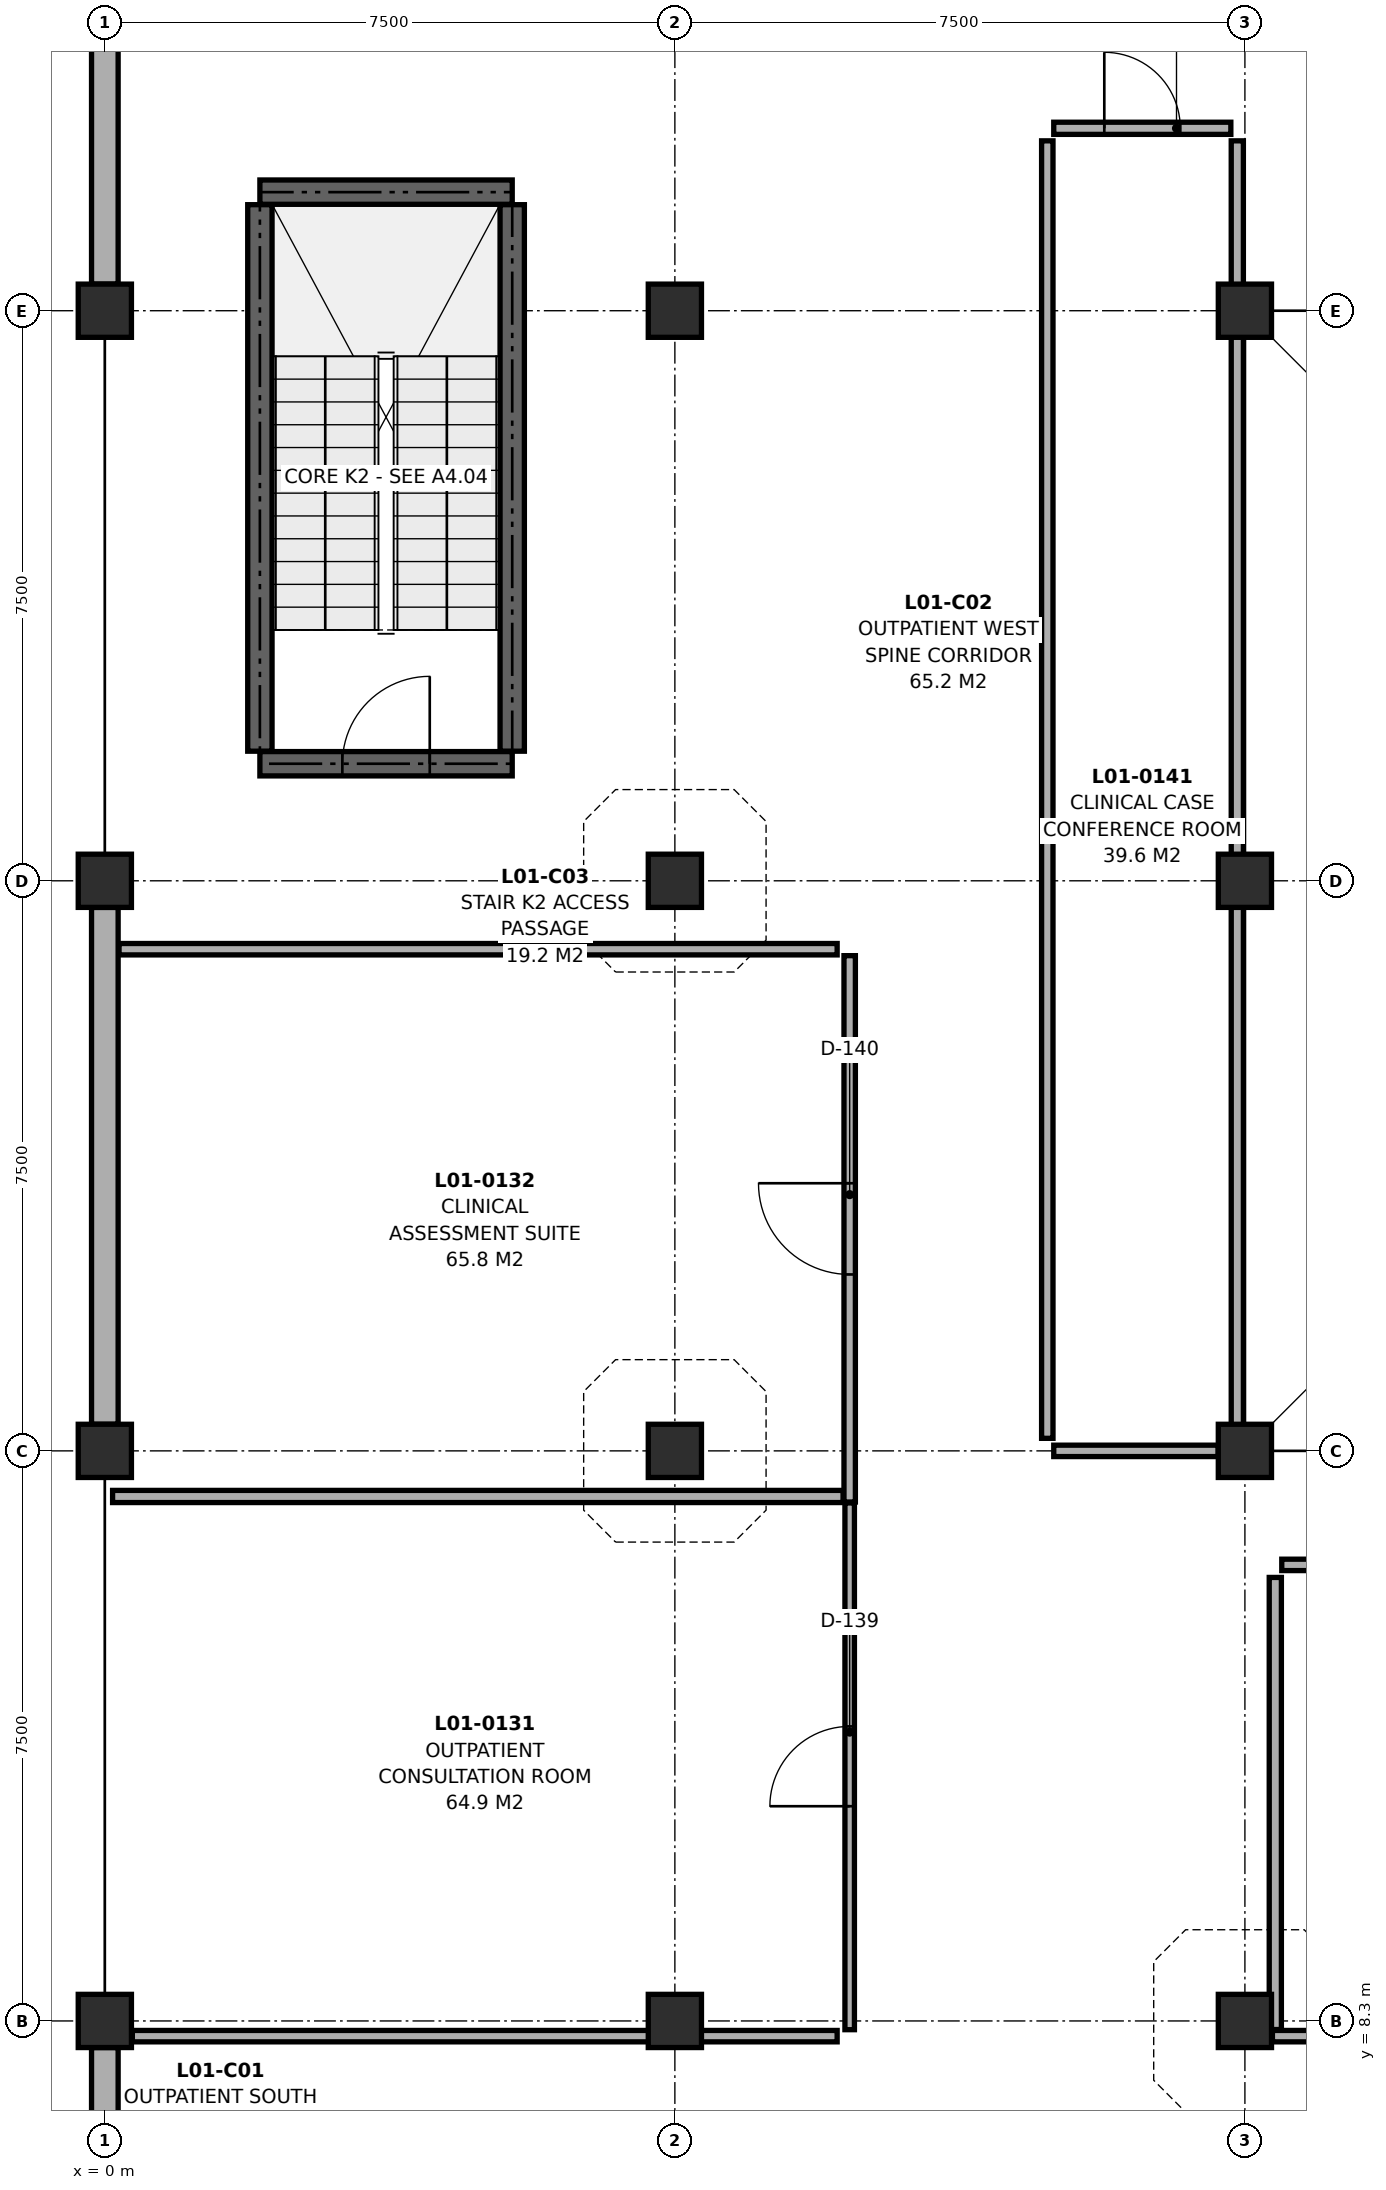
"""IFC4 building model, lengths in metres.
Left out: names, types, materials, properties, quantities, classifications, styles, units other than length and angle.
Written with IfcOpenShell. Run it as: python <this file> out.ifc"""

import sys

from ifc_helpers import new_model, si_unit, direction, frame, frame_2d, origin, origin_2d, place, context, subcontext, project, spatial, rectangle, extrude, element, fill, save


model = new_model("IFC4")
c1 = context("Model", 3, precision=1e-05, world=origin(), true_north=direction((0.0, 1.0)))
c2 = subcontext(c1, "Body", "Model", "MODEL_VIEW")
j1 = project(units=[si_unit("LENGTHUNIT", "METRE"), si_unit("PLANEANGLEUNIT", "RADIAN")], contexts=[c1])
p1 = place(None, origin())
s1 = spatial("IfcSite", under=j1, at=p1, CompositionType="ELEMENT")
p2 = place(p1, origin())
s2 = spatial("IfcBuilding", under=s1, at=p2, CompositionType="ELEMENT")
p3 = place(p2, frame((0.0, 0.0, 5.0)))
s3 = spatial("IfcBuildingStorey", under=s2, at=p3, CompositionType="ELEMENT", Elevation=5.0)
for number, where, z_axis, x_axis in (
    (1, (0.0, 8.3, 0.0), (0.0, 0.0, 1.0), (1.0, 0.0, 0.0)),
    (2, (0.0, 15.8, 0.0), (0.0, 0.0, 1.0), (1.0, 0.0, 0.0)),
    (3, (0.0, 23.3, 0.0), (0.0, 0.0, 1.0), (1.0, 0.0, 0.0)),
    (4, (0.0, 30.8, 0.0), (0.0, 0.0, 1.0), (1.0, 0.0, 0.0)),
    (5, (7.5, 8.3, 0.0), (0.0, 0.0, 1.0), (1.0, 0.0, 0.0)),
    (6, (7.5, 15.8, 0.0), (0.0, 0.0, 1.0), (1.0, 0.0, 0.0)),
    (7, (7.5, 23.3, 0.0), (0.0, 0.0, 1.0), (1.0, 0.0, 0.0)),
    (8, (7.5, 30.8, 0.0), (0.0, 0.0, 1.0), (1.0, 0.0, 0.0)),
    (9, (15.0, 8.3, 0.0), (0.0, 0.0, 1.0), (1.0, 0.0, 0.0)),
    (10, (15.0, 15.8, 0.0), (0.0, 0.0, 1.0), (1.0, 0.0, 0.0)),
    (11, (15.0, 23.3, 0.0), (0.0, 0.0, 1.0), (1.0, 0.0, 0.0)),
    (12, (15.0, 30.8, 0.0), (0.0, 0.0, 1.0), (1.0, 0.0, 0.0)),
):
    element("IfcColumn", number, at=place(p3, frame(where, z_axis=z_axis, x_axis=x_axis)), inside=s3, PredefinedType="COLUMN", context=c2, shape_type="SweptSolid", body=[
        extrude(rectangle(XDim=0.7, YDim=0.7, at=origin_2d()), origin(), (0.0, 0.0, 1.0), 4.2),
    ])
for number, where, z_axis, x_axis in (
    (13, (0.0, 1.15, 0.0), (0.0, 0.0, 1.0), (0.0, 1.0, 0.0)),
    (14, (0.0, 16.15, 0.0), (0.0, 0.0, 1.0), (0.0, 1.0, 0.0)),
    (15, (0.0, 31.15, 0.0), (0.0, 0.0, 1.0), (0.0, 1.0, 0.0)),
):
    element("IfcWall", number, at=place(p3, frame(where, z_axis=z_axis, x_axis=x_axis)), inside=s3, PredefinedType="SOLIDWALL", context=c2, shape_type="SweptSolid", body=[
        extrude(rectangle(XDim=6.8, YDim=0.35, at=frame_2d((3.4, 0.0))), origin(), (0.0, 0.0, 1.0), 3.535),
    ])
p4 = place(p3, frame((5.36, 25.005, 0.0), z_axis=(0.0, 0.0, 1.0), x_axis=(0.0, 1.0, 0.0)))
e16 = element("IfcWall", 16, at=p4, inside=s3, PredefinedType="SHEAR", context=c2, shape_type="SweptSolid", body=[
    extrude(rectangle(XDim=7.19, YDim=0.32, at=frame_2d((3.595, 0.0))), origin(), (0.0, 0.0, 1.0), 4.2),
])
p5 = place(p3, frame((5.36, 32.36, 0.0), z_axis=(0.0, 0.0, 1.0), x_axis=(-1.0, 0.0, 0.0)))
e17 = element("IfcWall", 17, at=p5, inside=s3, PredefinedType="SHEAR", context=c2, shape_type="SweptSolid", body=[
    extrude(rectangle(XDim=3.32, YDim=0.32, at=frame_2d((1.66, 0.0))), origin(), (0.0, 0.0, 1.0), 4.2),
])
p6 = place(p3, frame((2.04, 32.195, 0.0), z_axis=(0.0, 0.0, 1.0), x_axis=(0.0, -1.0, 0.0)))
e18 = element("IfcWall", 18, at=p6, inside=s3, PredefinedType="SHEAR", context=c2, shape_type="SweptSolid", body=[
    extrude(rectangle(XDim=7.19, YDim=0.32, at=frame_2d((3.595, 0.0))), origin(), (0.0, 0.0, 1.0), 4.2),
])
p7 = place(p3, frame((2.04, 24.84, 0.0), z_axis=(0.0, 0.0, 1.0), x_axis=(1.0, 0.0, 0.0)))
e19 = element("IfcWall", 19, at=p7, inside=s3, PredefinedType="SHEAR", context=c2, shape_type="SweptSolid", body=[
    extrude(rectangle(XDim=3.32, YDim=0.32, at=frame_2d((1.66, 0.0))), origin(), (0.0, 0.0, 1.0), 4.2),
])
p8 = place(p7, frame((1.085, 0.0, 0.0)))
e20 = element("IfcOpeningElement", 20, at=p8, cuts=e19, PredefinedType="OPENING", context=c2, shape_type="SweptSolid", body=[
    extrude(rectangle(XDim=1.15, YDim=2.15, at=frame_2d((0.575, 1.075))), frame((0.0, 0.172, 0.0), z_axis=(0.0, -1.0, 0.0), x_axis=(1.0, 0.0, 0.0)), (0.0, 0.0, 1.0), 0.344),
])
p9 = place(p3, frame((15.362, 8.1, 0.0), z_axis=(0.0, 0.0, 1.0), x_axis=(1.0, 0.0, 0.0)))
e21 = element("IfcWall", 21, at=p9, inside=s3, PredefinedType="PARTITIONING", context=c2, shape_type="SweptSolid", body=[
    extrude(rectangle(XDim=14.546, YDim=0.15, at=frame_2d((7.273, 0.0))), origin(), (0.0, 0.0, 1.0), 3.265),
])
p10 = place(p9, frame((7.662, 0.0, 0.0)))
e22 = element("IfcOpeningElement", 22, at=p10, cuts=e21, PredefinedType="OPENING", context=c2, shape_type="SweptSolid", body=[
    extrude(rectangle(XDim=1.56, YDim=2.3, at=frame_2d((0.78, 1.15))), frame((0.0, 0.087, 0.0), z_axis=(0.0, -1.0, 0.0), x_axis=(1.0, 0.0, 0.0)), (0.0, 0.0, 1.0), 0.174),
])
p11 = place(p3, frame((9.8, 8.185, 0.0), z_axis=(0.0, 0.0, 1.0), x_axis=(0.0, 1.0, 0.0)))
e23 = element("IfcWall", 23, at=p11, inside=s3, PredefinedType="PARTITIONING", context=c2, shape_type="SweptSolid", body=[
    extrude(rectangle(XDim=6.93, YDim=0.125, at=frame_2d((3.465, 0.0))), origin(), (0.0, 0.0, 1.0), 3.265),
])
p12 = place(p11, frame((2.94, 0.0, 0.0)))
e24 = element("IfcOpeningElement", 24, at=p12, cuts=e23, PredefinedType="OPENING", context=c2, shape_type="SweptSolid", body=[
    extrude(rectangle(XDim=1.05, YDim=2.15, at=frame_2d((0.525, 1.075))), frame((0.0, 0.074, 0.0), z_axis=(0.0, -1.0, 0.0), x_axis=(1.0, 0.0, 0.0)), (0.0, 0.0, 1.0), 0.149),
])
p13 = place(p3, frame((9.8, 15.127, 0.0), z_axis=(0.0, 0.0, 1.0), x_axis=(0.0, 1.0, 0.0)))
e25 = element("IfcWall", 25, at=p13, inside=s3, PredefinedType="PARTITIONING", context=c2, shape_type="SweptSolid", body=[
    extrude(rectangle(XDim=7.188, YDim=0.15, at=frame_2d((3.594, 0.0))), origin(), (0.0, 0.0, 1.0), 3.265),
])
p14 = place(p13, frame((2.994, 0.0, 0.0)))
e26 = element("IfcOpeningElement", 26, at=p14, cuts=e25, PredefinedType="OPENING", context=c2, shape_type="SweptSolid", body=[
    extrude(rectangle(XDim=1.2, YDim=2.15, at=frame_2d((0.6, 1.075))), frame((0.0, 0.087, 0.0), z_axis=(0.0, -1.0, 0.0), x_axis=(1.0, 0.0, 0.0)), (0.0, 0.0, 1.0), 0.174),
])
p15 = place(p3, frame((12.485, 33.2, 0.0), z_axis=(0.0, 0.0, 1.0), x_axis=(1.0, 0.0, 0.0)))
e27 = element("IfcWall", 27, at=p15, inside=s3, PredefinedType="PARTITIONING", context=c2, shape_type="SweptSolid", body=[
    extrude(rectangle(XDim=2.33, YDim=0.16, at=frame_2d((1.165, 0.0))), origin(), (0.0, 0.0, 1.0), 3.265),
])
p16 = place(p15, frame((0.665, 0.0, 0.0)))
e28 = element("IfcOpeningElement", 28, at=p16, cuts=e27, PredefinedType="OPENING", context=c2, shape_type="SweptSolid", body=[
    extrude(rectangle(XDim=1.0, YDim=2.22, at=frame_2d((0.5, 1.11))), frame((0.0, 0.092, 0.0), z_axis=(0.0, -1.0, 0.0), x_axis=(1.0, 0.0, 0.0)), (0.0, 0.0, 1.0), 0.184),
])
p17 = place(p3, frame((15.485, 14.3, 0.0), z_axis=(0.0, 0.0, 1.0), x_axis=(1.0, 0.0, 0.0)))
e29 = element("IfcWall", 29, at=p17, inside=s3, PredefinedType="PARTITIONING", context=c2, shape_type="SweptSolid", body=[
    extrude(rectangle(XDim=14.59, YDim=0.15, at=frame_2d((7.295, 0.0))), origin(), (0.0, 0.0, 1.0), 3.265),
])
p18 = place(p3, frame((12.485, 15.8, 0.0), z_axis=(0.0, 0.0, 1.0), x_axis=(1.0, 0.0, 0.0)))
e30 = element("IfcWall", 30, at=p18, inside=s3, PredefinedType="PARTITIONING", context=c2, shape_type="SweptSolid", body=[
    extrude(rectangle(XDim=2.163, YDim=0.15, at=frame_2d((1.082, 0.0))), origin(), (0.0, 0.0, 1.0), 3.265),
])
p19 = place(p3, frame((15.4, 8.187, 0.0), z_axis=(0.0, 0.0, 1.0), x_axis=(0.0, 1.0, 0.0)))
e31 = element("IfcWall", 31, at=p19, inside=s3, PredefinedType="PARTITIONING", context=c2, shape_type="SweptSolid", body=[
    extrude(rectangle(XDim=5.948, YDim=0.16, at=frame_2d((2.974, 0.0))), origin(), (0.0, 0.0, 1.0), 3.265),
])
p20 = place(p3, frame((0.362, 8.1, 0.0), z_axis=(0.0, 0.0, 1.0), x_axis=(1.0, 0.0, 0.0)))
e32 = element("IfcWall", 32, at=p20, inside=s3, PredefinedType="PARTITIONING", context=c2, shape_type="SweptSolid", body=[
    extrude(rectangle(XDim=9.273, YDim=0.15, at=frame_2d((4.636, 0.0))), origin(), (0.0, 0.0, 1.0), 3.265),
])
p21 = place(p3, frame((0.102, 15.2, 0.0), z_axis=(0.0, 0.0, 1.0), x_axis=(1.0, 0.0, 0.0)))
e33 = element("IfcWall", 33, at=p21, inside=s3, PredefinedType="PARTITIONING", context=c2, shape_type="SweptSolid", body=[
    extrude(rectangle(XDim=9.611, YDim=0.16, at=frame_2d((4.805, 0.0))), origin(), (0.0, 0.0, 1.0), 3.265),
])
p22 = place(p3, frame((0.187, 22.4, 0.0), z_axis=(0.0, 0.0, 1.0), x_axis=(1.0, 0.0, 0.0)))
e34 = element("IfcWall", 34, at=p22, inside=s3, PredefinedType="PARTITIONING", context=c2, shape_type="SweptSolid", body=[
    extrude(rectangle(XDim=9.448, YDim=0.15, at=frame_2d((4.724, 0.0))), origin(), (0.0, 0.0, 1.0), 3.265),
])
p23 = place(p3, frame((12.4, 15.965, 0.0), z_axis=(0.0, 0.0, 1.0), x_axis=(0.0, 1.0, 0.0)))
e35 = element("IfcWall", 35, at=p23, inside=s3, PredefinedType="PARTITIONING", context=c2, shape_type="SweptSolid", body=[
    extrude(rectangle(XDim=17.07, YDim=0.15, at=frame_2d((8.535, 0.0))), origin(), (0.0, 0.0, 1.0), 3.265),
])
p24 = place(p3, frame((14.9, 16.132, 0.0), z_axis=(0.0, 0.0, 1.0), x_axis=(0.0, 1.0, 0.0)))
e36 = element("IfcWall", 36, at=p24, inside=s3, PredefinedType="PARTITIONING", context=c2, shape_type="SweptSolid", body=[
    extrude(rectangle(XDim=16.903, YDim=0.16, at=frame_2d((8.451, 0.0))), origin(), (0.0, 0.0, 1.0), 3.265),
])
p25 = place(p8, origin())
e37 = element("IfcDoor", 37, at=p25, inside=s3, OperationType="SINGLE_SWING_RIGHT", PredefinedType="DOOR", context=c2, shape_type="SweptSolid", body=[
    extrude(rectangle(XDim=1.15, YDim=2.15, at=frame_2d((0.575, 1.075))), frame((0.0, 0.025, 0.0), z_axis=(0.0, -1.0, 0.0), x_axis=(1.0, 0.0, 0.0)), (0.0, 0.0, 1.0), 0.05),
])
fill(e20, e37)
p26 = place(p12, origin())
e38 = element("IfcDoor", 38, at=p26, inside=s3, OperationType="SINGLE_SWING_LEFT", PredefinedType="DOOR", context=c2, shape_type="SweptSolid", body=[
    extrude(rectangle(XDim=1.05, YDim=2.15, at=frame_2d((0.525, 1.075))), frame((0.0, 0.025, 0.0), z_axis=(0.0, -1.0, 0.0), x_axis=(1.0, 0.0, 0.0)), (0.0, 0.0, 1.0), 0.05),
])
fill(e24, e38)
p27 = place(p14, origin())
e39 = element("IfcDoor", 39, at=p27, inside=s3, OperationType="SINGLE_SWING_RIGHT", PredefinedType="DOOR", context=c2, shape_type="SweptSolid", body=[
    extrude(rectangle(XDim=1.2, YDim=2.15, at=frame_2d((0.6, 1.075))), frame((0.0, 0.025, 0.0), z_axis=(0.0, -1.0, 0.0), x_axis=(1.0, 0.0, 0.0)), (0.0, 0.0, 1.0), 0.05),
])
fill(e26, e39)
p28 = place(p16, origin())
e40 = element("IfcDoor", 40, at=p28, inside=s3, OperationType="SINGLE_SWING_LEFT", PredefinedType="DOOR", context=c2, shape_type="SweptSolid", body=[
    extrude(rectangle(XDim=1.0, YDim=2.22, at=frame_2d((0.5, 1.11))), frame((0.0, 0.025, 0.0), z_axis=(0.0, -1.0, 0.0), x_axis=(1.0, 0.0, 0.0)), (0.0, 0.0, 1.0), 0.05),
])
fill(e28, e40)
save(model, sys.argv[1])
